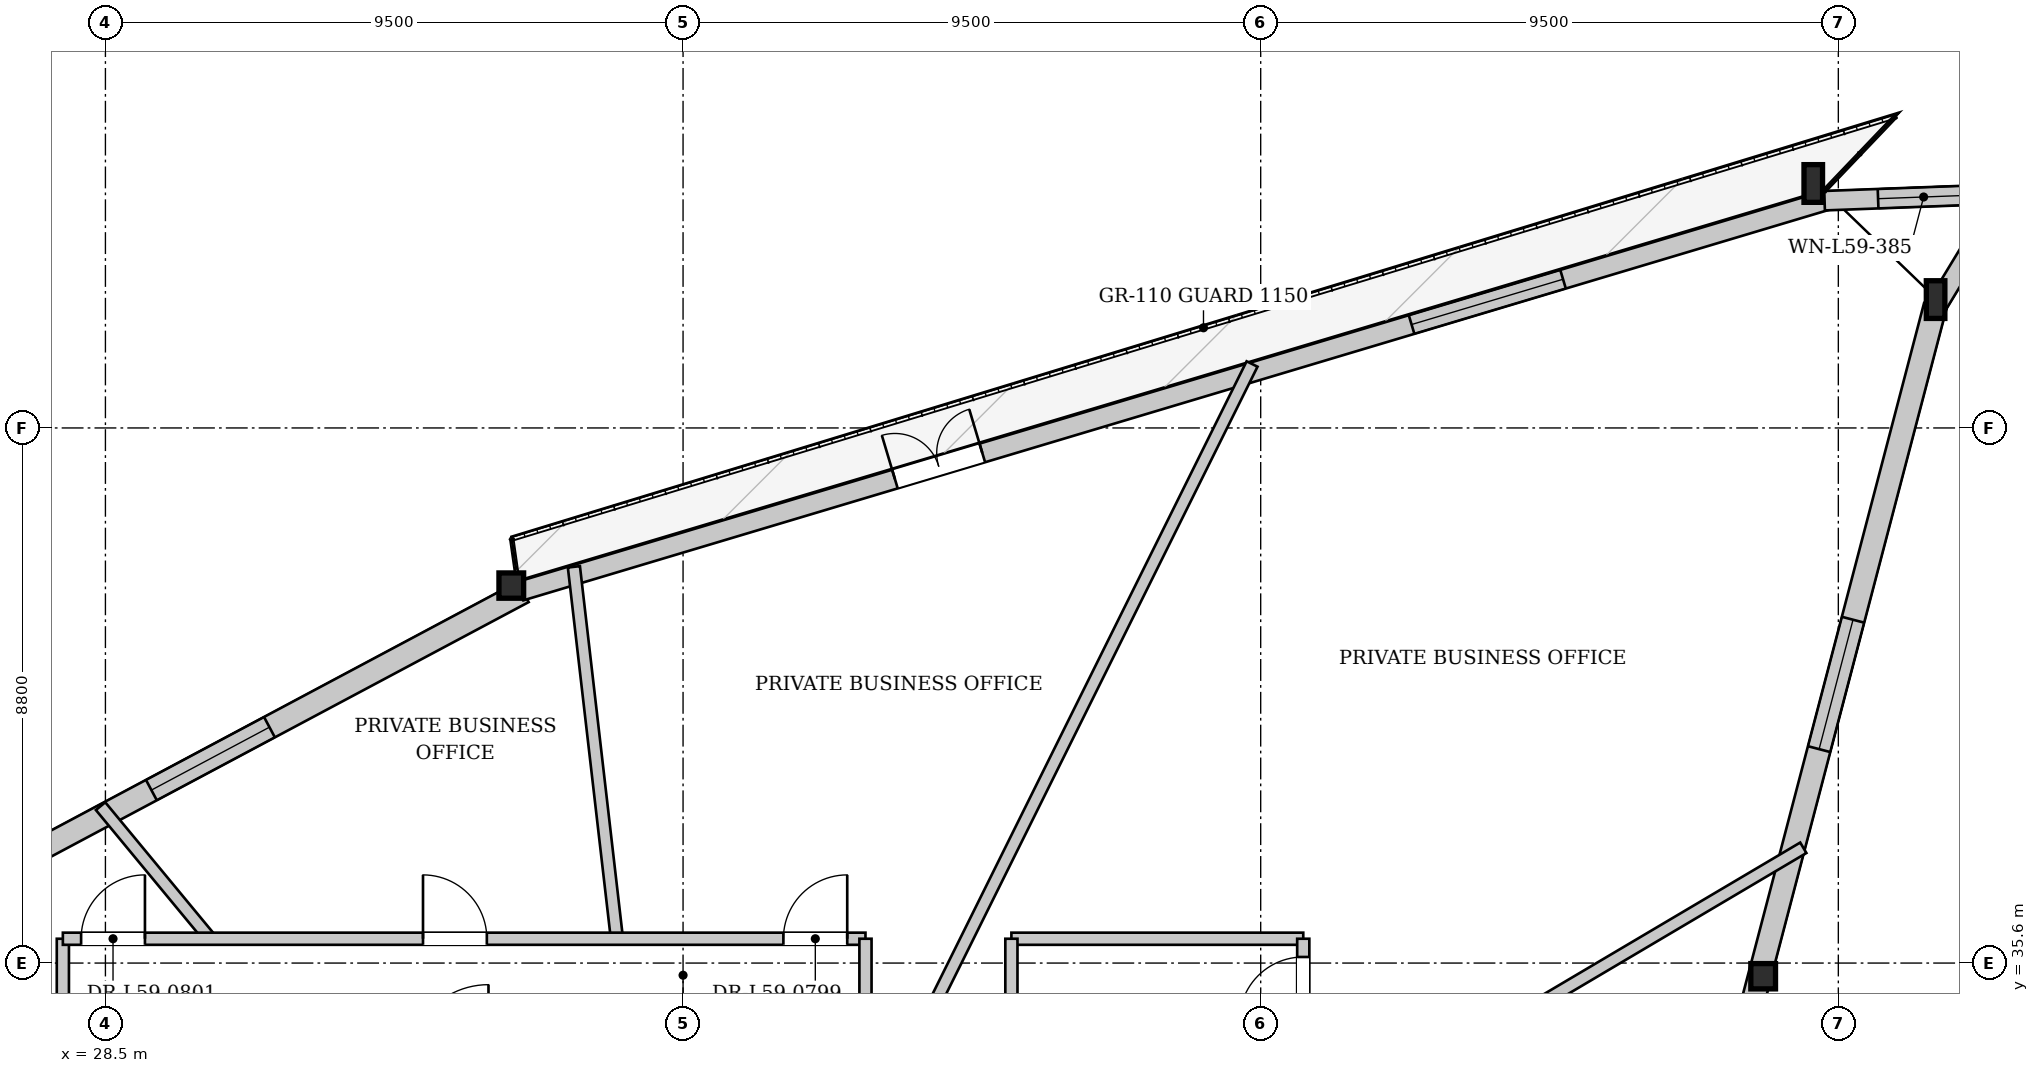
"""IFC4 building model, lengths in metres.
Left out: names, types, materials, properties, quantities, classifications, styles, units other than length and angle.
Written with IfcOpenShell. Run it as: python <this file> out.ifc"""

import sys

from ifc_helpers import new_model, si_unit, direction, frame, frame_2d, origin, origin_2d, place, context, subcontext, project, spatial, rectangle, i_section, extrude, source, transform, mapped, element, fill, save


model = new_model("IFC4")
c1 = context("Model", 3, precision=1e-05, world=origin(), true_north=direction((0.0, 1.0)))
c2 = subcontext(c1, "Body", "Model", "MODEL_VIEW")
j1 = project(units=[si_unit("LENGTHUNIT", "METRE"), si_unit("PLANEANGLEUNIT", "RADIAN")], contexts=[c1])
p1 = place(None, origin())
s1 = spatial("IfcSite", under=j1, at=p1, CompositionType="ELEMENT")
p2 = place(p1, origin())
s2 = spatial("IfcBuilding", under=s1, at=p2, CompositionType="ELEMENT")
p3 = place(p2, frame((0.0, 0.0, 223.8)))
s3 = spatial("IfcBuildingStorey", under=s2, at=p3, CompositionType="ELEMENT", Elevation=223.8)
m1 = source(origin(), c2, "Body", "SweptSolid", [
    extrude(i_section(OverallWidth=0.305, OverallDepth=0.62, WebThickness=0.021, FlangeThickness=0.04, at=origin_2d()), origin(), (0.0, 0.0, 1.0), 3.417),
])
p4 = place(p3, frame((58.778, 46.359, 0.0), z_axis=(-0.104447708162, 0.089016309418, 0.990538627676), x_axis=(-0.648645206746, -0.761090924769, 0.0)))
e1 = element("IfcColumn", 1, at=p4, inside=s3, PredefinedType="COLUMN", context=c2, shape_type="MappedRepresentation", body=[
    mapped(m1, transform((0.0, 0.0, 0.0), x_axis=(1.0, 0.0, 0.0), y_axis=(0.0, 1.0, 0.0), z_axis=(0.0, 0.0, 1.0), scale=1.0)),
])
m2 = source(origin(), c2, "Body", "SweptSolid", [
    extrude(i_section(OverallWidth=0.305, OverallDepth=0.62, WebThickness=0.021, FlangeThickness=0.04, at=origin_2d()), origin(), (0.0, 0.0, 1.0), 3.413),
])
p5 = place(p3, frame((56.767, 48.297, 0.0), z_axis=(-0.105156454528, 0.072178818108, 0.991832817711), x_axis=(-0.56590978088, -0.824467173333, 0.0)))
e2 = element("IfcColumn", 2, at=p5, inside=s3, PredefinedType="COLUMN", context=c2, shape_type="MappedRepresentation", body=[
    mapped(m2, transform((0.0, 0.0, 0.0), x_axis=(1.0, 0.0, 0.0), y_axis=(0.0, 1.0, 0.0), z_axis=(0.0, 0.0, 1.0), scale=1.0)),
])
m3 = source(origin(), c2, "Body", "SweptSolid", [
    extrude(i_section(OverallWidth=0.406, OverallDepth=0.416, WebThickness=0.027, FlangeThickness=0.042, at=origin_2d()), origin(), (0.0, 0.0, 1.0), 3.394),
])
p6 = place(p3, frame((35.282, 41.871, 0.0), z_axis=(-0.063010651639, -0.037475513132, 0.99730900111), x_axis=(0.511173344598, -0.859477638902, 0.0)))
e3 = element("IfcColumn", 3, at=p6, inside=s3, PredefinedType="COLUMN", context=c2, shape_type="MappedRepresentation", body=[
    mapped(m3, transform((0.0, 0.0, 0.0), x_axis=(1.0, 0.0, 0.0), y_axis=(0.0, 1.0, 0.0), z_axis=(0.0, 0.0, 1.0), scale=1.0)),
])
m4 = source(origin(), c2, "Body", "SweptSolid", [
    extrude(i_section(OverallWidth=0.406, OverallDepth=0.416, WebThickness=0.027, FlangeThickness=0.042, at=origin_2d()), origin(), (0.0, 0.0, 1.0), 3.403),
])
p7 = place(p3, frame((55.865, 35.243, 0.0), z_axis=(-0.059266938757, 0.082370999628, 0.99483790056), x_axis=(-0.811722058131, -0.584043919875, 0.0)))
e4 = element("IfcColumn", 4, at=p7, inside=s3, PredefinedType="COLUMN", context=c2, shape_type="MappedRepresentation", body=[
    mapped(m4, transform((0.0, 0.0, 0.0), x_axis=(1.0, 0.0, 0.0), y_axis=(0.0, 1.0, 0.0), z_axis=(0.0, 0.0, 1.0), scale=1.0)),
])
p8 = place(p3, frame((15.581, 31.156, 0.0), z_axis=(0.0, 0.0, 1.0), x_axis=(0.882484000586, 0.470342416448, 0.0)))
e5 = element("IfcWall", 5, at=p8, inside=s3, PredefinedType="SOLIDWALL", context=c2, shape_type="SweptSolid", body=[
    extrude(rectangle(XDim=22.425, YDim=0.38, at=frame_2d((11.213, 0.0))), origin(), (0.0, 0.0, 1.0), 2.822),
])
p9 = place(p8, frame((5.179, 0.0, 0.452)))
e6 = element("IfcOpeningElement", 6, at=p9, cuts=e5, PredefinedType="OPENING", context=c2, shape_type="SweptSolid", body=[
    extrude(rectangle(XDim=2.2, YDim=2.25, at=frame_2d((1.1, 1.125))), frame((0.0, 0.2, 0.0), z_axis=(0.0, -1.0, 0.0), x_axis=(1.0, 0.0, 0.0)), (0.0, 0.0, 1.0), 0.4),
])
p10 = place(p8, frame((15.496, 0.0, 0.452)))
e7 = element("IfcOpeningElement", 7, at=p10, cuts=e5, PredefinedType="OPENING", context=c2, shape_type="SweptSolid", body=[
    extrude(rectangle(XDim=2.2, YDim=2.25, at=frame_2d((1.1, 1.125))), frame((0.0, 0.2, 0.0), z_axis=(0.0, -1.0, 0.0), x_axis=(1.0, 0.0, 0.0)), (0.0, 0.0, 1.0), 0.4),
])
p11 = place(p3, frame((35.328, 41.718, 0.0), z_axis=(0.0, 0.0, 1.0), x_axis=(0.958068349803, 0.286539765313, 0.0)))
e8 = element("IfcWall", 8, at=p11, inside=s3, PredefinedType="SOLIDWALL", context=c2, shape_type="SweptSolid", body=[
    extrude(rectangle(XDim=22.426, YDim=0.32, at=frame_2d((11.213, 0.0))), origin(), (0.0, 0.0, 1.0), 2.822),
])
p12 = place(p11, frame((6.426, 0.0, 0.0)))
e9 = element("IfcOpeningElement", 9, at=p12, cuts=e8, PredefinedType="OPENING", context=c2, shape_type="SweptSolid", body=[
    extrude(rectangle(XDim=1.5, YDim=2.3, at=frame_2d((0.75, 1.15))), frame((0.0, 0.17, 0.0), z_axis=(0.0, -1.0, 0.0), x_axis=(1.0, 0.0, 0.0)), (0.0, 0.0, 1.0), 0.34),
])
p13 = place(p11, frame((15.295, 0.0, 0.352)))
e10 = element("IfcOpeningElement", 10, at=p13, cuts=e8, PredefinedType="OPENING", context=c2, shape_type="SweptSolid", body=[
    extrude(rectangle(XDim=2.6, YDim=2.35, at=frame_2d((1.3, 1.175))), frame((0.0, 0.17, 0.0), z_axis=(0.0, -1.0, 0.0), x_axis=(1.0, 0.0, 0.0)), (0.0, 0.0, 1.0), 0.34),
])
p14 = place(p3, frame((56.773, 48.137, 0.0), z_axis=(0.0, 0.0, 1.0), x_axis=(0.999302372167, 0.03734660603, 0.0)))
e11 = element("IfcWall", 11, at=p14, inside=s3, PredefinedType="SOLIDWALL", context=c2, shape_type="SweptSolid", body=[
    extrude(rectangle(XDim=3.262, YDim=0.32, at=frame_2d((1.631, 0.0))), origin(), (0.0, 0.0, 1.0), 2.822),
])
p15 = place(p14, frame((0.881, 0.0, 0.402)))
e12 = element("IfcOpeningElement", 12, at=p15, cuts=e11, PredefinedType="OPENING", context=c2, shape_type="SweptSolid", body=[
    extrude(rectangle(XDim=1.5, YDim=2.3, at=frame_2d((0.75, 1.15))), frame((0.0, 0.17, 0.0), z_axis=(0.0, -1.0, 0.0), x_axis=(1.0, 0.0, 0.0)), (0.0, 0.0, 1.0), 0.34),
])
p16 = place(p3, frame((59.89, 48.502, 0.0), z_axis=(0.0, 0.0, 1.0), x_axis=(-0.518454432152, -0.855105257721, 0.0)))
e13 = element("IfcWall", 13, at=p16, inside=s3, PredefinedType="SOLIDWALL", context=c2, shape_type="SweptSolid", body=[
    extrude(rectangle(XDim=2.409, YDim=0.32, at=frame_2d((1.205, 0.0))), origin(), (0.0, 0.0, 1.0), 2.822),
])
p17 = place(p3, frame((58.594, 46.407, 0.0), z_axis=(0.0, 0.0, 1.0), x_axis=(-0.253530518145, -0.96732738841, 0.0)))
e14 = element("IfcWall", 14, at=p17, inside=s3, PredefinedType="SOLIDWALL", context=c2, shape_type="SweptSolid", body=[
    extrude(rectangle(XDim=22.982, YDim=0.38, at=frame_2d((11.491, 0.0))), origin(), (0.0, 0.0, 1.0), 2.822),
])
p18 = place(p17, frame((5.335, 0.0, 0.452)))
e15 = element("IfcOpeningElement", 15, at=p18, cuts=e14, PredefinedType="OPENING", context=c2, shape_type="SweptSolid", body=[
    extrude(rectangle(XDim=2.2, YDim=2.25, at=frame_2d((1.1, 1.125))), frame((0.0, 0.2, 0.0), z_axis=(0.0, -1.0, 0.0), x_axis=(1.0, 0.0, 0.0)), (0.0, 0.0, 1.0), 0.4),
])
p19 = place(p17, frame((15.447, 0.0, 0.452)))
e16 = element("IfcOpeningElement", 16, at=p19, cuts=e14, PredefinedType="OPENING", context=c2, shape_type="SweptSolid", body=[
    extrude(rectangle(XDim=2.2, YDim=2.25, at=frame_2d((1.1, 1.125))), frame((0.0, 0.2, 0.0), z_axis=(0.0, -1.0, 0.0), x_axis=(1.0, 0.0, 0.0)), (0.0, 0.0, 1.0), 0.4),
])
p20 = place(p3, frame((48.2, 32.632, 0.0), z_axis=(0.0, 0.0, 1.0), x_axis=(0.860740290166, 0.509044352571, 0.0)))
e17 = element("IfcWall", 17, at=p20, inside=s3, PredefinedType="PARTITIONING", context=c2, shape_type="SweptSolid", body=[
    extrude(rectangle(XDim=9.555, YDim=0.2, at=frame_2d((4.777, 0.0))), origin(), (0.0, 0.0, 1.0), 3.33),
])
p21 = place(p3, frame((41.748, 34.15, 0.0), z_axis=(0.0, 0.0, 1.0), x_axis=(0.44463448422, 0.895712105222, 0.0)))
e18 = element("IfcWall", 18, at=p21, inside=s3, PredefinedType="PARTITIONING", context=c2, shape_type="SweptSolid", body=[
    extrude(rectangle(XDim=12.618, YDim=0.2, at=frame_2d((6.309, 0.0))), origin(), (0.0, 0.0, 1.0), 3.33),
])
p22 = place(p3, frame((36.912, 36.0, 0.0), z_axis=(0.0, 0.0, 1.0), x_axis=(-0.114952203338, 0.993371023811, 0.0)))
e19 = element("IfcWall", 19, at=p22, inside=s3, PredefinedType="PARTITIONING", context=c2, shape_type="SweptSolid", body=[
    extrude(rectangle(XDim=6.157, YDim=0.2, at=frame_2d((3.079, 0.0))), origin(), (0.0, 0.0, 1.0), 3.33),
])
p23 = place(p3, frame((30.224, 36.0, 0.0), z_axis=(0.0, 0.0, 1.0), x_axis=(-0.637396404574, 0.770536062386, 0.0)))
e20 = element("IfcWall", 20, at=p23, inside=s3, PredefinedType="PARTITIONING", context=c2, shape_type="SweptSolid", body=[
    extrude(rectangle(XDim=2.829, YDim=0.2, at=frame_2d((1.415, 0.0))), origin(), (0.0, 0.0, 1.0), 3.33),
])
p24 = place(p3, frame((27.8, 17.2, 0.0), z_axis=(0.0, 0.0, 1.0), x_axis=(0.0, 1.0, 0.0)))
e21 = element("IfcWall", 21, at=p24, inside=s3, PredefinedType="PARTITIONING", context=c2, shape_type="SweptSolid", body=[
    extrude(rectangle(XDim=18.8, YDim=0.2, at=frame_2d((9.4, 0.0))), origin(), (0.0, 0.0, 1.0), 3.33),
])
p25 = place(p24, frame((7.944, 0.0, 0.0)))
e22 = element("IfcOpeningElement", 22, at=p25, cuts=e21, PredefinedType="OPENING", context=c2, shape_type="SweptSolid", body=[
    extrude(rectangle(XDim=1.05, YDim=2.2, at=frame_2d((0.525, 1.1))), frame((0.0, 0.11, 0.0), z_axis=(0.0, -1.0, 0.0), x_axis=(1.0, 0.0, 0.0)), (0.0, 0.0, 1.0), 0.22),
])
p26 = place(p24, frame((1.628, 0.0, 0.0)))
e23 = element("IfcOpeningElement", 23, at=p26, cuts=e21, PredefinedType="OPENING", context=c2, shape_type="SweptSolid", body=[
    extrude(rectangle(XDim=1.05, YDim=2.2, at=frame_2d((0.525, 1.1))), frame((0.0, 0.11, 0.0), z_axis=(0.0, -1.0, 0.0), x_axis=(1.0, 0.0, 0.0)), (0.0, 0.0, 1.0), 0.22),
])
p27 = place(p3, frame((27.8, 36.0, 0.0), z_axis=(0.0, 0.0, 1.0), x_axis=(1.0, 0.0, 0.0)))
e24 = element("IfcWall", 24, at=p27, inside=s3, PredefinedType="PARTITIONING", context=c2, shape_type="SweptSolid", body=[
    extrude(rectangle(XDim=13.2, YDim=0.2, at=frame_2d((6.6, 0.0))), origin(), (0.0, 0.0, 1.0), 3.33),
])
p28 = place(p27, frame((11.85, 0.0, 0.0)))
e25 = element("IfcOpeningElement", 25, at=p28, cuts=e24, PredefinedType="OPENING", context=c2, shape_type="SweptSolid", body=[
    extrude(rectangle(XDim=1.05, YDim=2.2, at=frame_2d((0.525, 1.1))), frame((0.0, 0.11, 0.0), z_axis=(0.0, -1.0, 0.0), x_axis=(1.0, 0.0, 0.0)), (0.0, 0.0, 1.0), 0.22),
])
p29 = place(p27, frame((5.923, 0.0, 0.0)))
e26 = element("IfcOpeningElement", 26, at=p29, cuts=e24, PredefinedType="OPENING", context=c2, shape_type="SweptSolid", body=[
    extrude(rectangle(XDim=1.05, YDim=2.2, at=frame_2d((0.525, 1.1))), frame((0.0, 0.11, 0.0), z_axis=(0.0, -1.0, 0.0), x_axis=(1.0, 0.0, 0.0)), (0.0, 0.0, 1.0), 0.22),
])
p30 = place(p27, frame((0.3, 0.0, 0.0)))
e27 = element("IfcOpeningElement", 27, at=p30, cuts=e24, PredefinedType="OPENING", context=c2, shape_type="SweptSolid", body=[
    extrude(rectangle(XDim=1.05, YDim=2.2, at=frame_2d((0.525, 1.1))), frame((0.0, 0.11, 0.0), z_axis=(0.0, -1.0, 0.0), x_axis=(1.0, 0.0, 0.0)), (0.0, 0.0, 1.0), 0.22),
])
p31 = place(p3, frame((41.0, 34.15, 0.0), z_axis=(0.0, 0.0, 1.0), x_axis=(0.0, 1.0, 0.0)))
e28 = element("IfcWall", 28, at=p31, inside=s3, PredefinedType="PARTITIONING", context=c2, shape_type="SweptSolid", body=[
    extrude(rectangle(XDim=1.85, YDim=0.2, at=frame_2d((0.925, 0.0))), origin(), (0.0, 0.0, 1.0), 3.33),
])
p32 = place(p3, frame((43.4, 36.0, 0.0), z_axis=(0.0, 0.0, 1.0), x_axis=(1.0, 0.0, 0.0)))
e29 = element("IfcWall", 29, at=p32, inside=s3, PredefinedType="PARTITIONING", context=c2, shape_type="SweptSolid", body=[
    extrude(rectangle(XDim=4.8, YDim=0.2, at=frame_2d((2.4, 0.0))), origin(), (0.0, 0.0, 1.0), 3.33),
])
p33 = place(p3, frame((43.4, 34.15, 0.0), z_axis=(0.0, 0.0, 1.0), x_axis=(0.0, 1.0, 0.0)))
e30 = element("IfcWall", 30, at=p33, inside=s3, PredefinedType="PARTITIONING", context=c2, shape_type="SweptSolid", body=[
    extrude(rectangle(XDim=1.85, YDim=0.2, at=frame_2d((0.925, 0.0))), origin(), (0.0, 0.0, 1.0), 3.33),
])
p34 = place(p3, frame((48.2, 17.2, 0.0), z_axis=(0.0, 0.0, 1.0), x_axis=(0.0, 1.0, 0.0)))
e31 = element("IfcWall", 31, at=p34, inside=s3, PredefinedType="PARTITIONING", context=c2, shape_type="SweptSolid", body=[
    extrude(rectangle(XDim=18.8, YDim=0.2, at=frame_2d((9.4, 0.0))), origin(), (0.0, 0.0, 1.0), 3.015),
])
p35 = place(p34, frame((11.705, 0.0, 0.0)))
e32 = element("IfcOpeningElement", 32, at=p35, cuts=e31, PredefinedType="OPENING", context=c2, shape_type="SweptSolid", body=[
    extrude(rectangle(XDim=1.05, YDim=2.2, at=frame_2d((0.525, 1.1))), frame((0.0, 0.11, 0.0), z_axis=(0.0, -1.0, 0.0), x_axis=(1.0, 0.0, 0.0)), (0.0, 0.0, 1.0), 0.22),
])
p36 = place(p34, frame((17.45, 0.0, 0.0)))
e33 = element("IfcOpeningElement", 33, at=p36, cuts=e31, PredefinedType="OPENING", context=c2, shape_type="SweptSolid", body=[
    extrude(rectangle(XDim=1.05, YDim=2.2, at=frame_2d((0.525, 1.1))), frame((0.0, 0.11, 0.0), z_axis=(0.0, -1.0, 0.0), x_axis=(1.0, 0.0, 0.0)), (0.0, 0.0, 1.0), 0.22),
])
p37 = place(p34, frame((0.3, 0.0, 0.0)))
e34 = element("IfcOpeningElement", 34, at=p37, cuts=e31, PredefinedType="OPENING", context=c2, shape_type="SweptSolid", body=[
    extrude(rectangle(XDim=1.05, YDim=2.2, at=frame_2d((0.525, 1.1))), frame((0.0, 0.11, 0.0), z_axis=(0.0, -1.0, 0.0), x_axis=(1.0, 0.0, 0.0)), (0.0, 0.0, 1.0), 0.22),
])
p38 = place(p34, frame((4.377, 0.0, 0.0)))
e35 = element("IfcOpeningElement", 35, at=p38, cuts=e31, PredefinedType="OPENING", context=c2, shape_type="SweptSolid", body=[
    extrude(rectangle(XDim=0.9, YDim=2.1, at=frame_2d((0.45, 1.05))), frame((0.0, 0.11, 0.0), z_axis=(0.0, -1.0, 0.0), x_axis=(1.0, 0.0, 0.0)), (0.0, 0.0, 1.0), 0.22),
])
m5 = source(origin(), c2, "Body", "SweptSolid", [
    extrude(rectangle(XDim=2.2, YDim=2.25, at=frame_2d((1.1, 1.125))), frame((0.0, 0.03, 0.0), z_axis=(0.0, -1.0, 0.0), x_axis=(1.0, 0.0, 0.0)), (0.0, 0.0, 1.0), 0.06),
])
p39 = place(p10, origin())
e36 = element("IfcWindow", 36, at=p39, inside=s3, PartitioningType="SINGLE_PANEL", PredefinedType="WINDOW", context=c2, shape_type="MappedRepresentation", body=[
    mapped(m5, transform((0.0, 0.0, 0.0), x_axis=(1.0, 0.0, 0.0), y_axis=(0.0, 1.0, 0.0), z_axis=(0.0, 0.0, 1.0), scale=1.0)),
])
fill(e7, e36)
m6 = source(origin(), c2, "Body", "SweptSolid", [
    extrude(rectangle(XDim=1.5, YDim=2.3, at=frame_2d((0.75, 1.15))), frame((0.0, 0.025, 0.0), z_axis=(0.0, -1.0, 0.0), x_axis=(1.0, 0.0, 0.0)), (0.0, 0.0, 1.0), 0.05),
])
p40 = place(p12, origin())
e37 = element("IfcDoor", 37, at=p40, inside=s3, OperationType="DOUBLE_DOOR_SINGLE_SWING", PredefinedType="DOOR", context=c2, shape_type="MappedRepresentation", body=[
    mapped(m6, transform((0.0, 0.0, 0.0), x_axis=(1.0, 0.0, 0.0), y_axis=(0.0, 1.0, 0.0), z_axis=(0.0, 0.0, 1.0), scale=1.0)),
])
fill(e9, e37)
m7 = source(origin(), c2, "Body", "SweptSolid", [
    extrude(rectangle(XDim=2.6, YDim=2.35, at=frame_2d((1.3, 1.175))), frame((0.0, 0.03, 0.0), z_axis=(0.0, -1.0, 0.0), x_axis=(1.0, 0.0, 0.0)), (0.0, 0.0, 1.0), 0.06),
])
p41 = place(p13, origin())
e38 = element("IfcWindow", 38, at=p41, inside=s3, PartitioningType="SINGLE_PANEL", PredefinedType="WINDOW", context=c2, shape_type="MappedRepresentation", body=[
    mapped(m7, transform((0.0, 0.0, 0.0), x_axis=(1.0, 0.0, 0.0), y_axis=(0.0, 1.0, 0.0), z_axis=(0.0, 0.0, 1.0), scale=1.0)),
])
fill(e10, e38)
m8 = source(origin(), c2, "Body", "SweptSolid", [
    extrude(rectangle(XDim=1.5, YDim=2.3, at=frame_2d((0.75, 1.15))), frame((0.0, 0.03, 0.0), z_axis=(0.0, -1.0, 0.0), x_axis=(1.0, 0.0, 0.0)), (0.0, 0.0, 1.0), 0.06),
])
p42 = place(p15, origin())
e39 = element("IfcWindow", 39, at=p42, inside=s3, PartitioningType="SINGLE_PANEL", PredefinedType="WINDOW", context=c2, shape_type="MappedRepresentation", body=[
    mapped(m8, transform((0.0, 0.0, 0.0), x_axis=(1.0, 0.0, 0.0), y_axis=(0.0, 1.0, 0.0), z_axis=(0.0, 0.0, 1.0), scale=1.0)),
])
fill(e12, e39)
p43 = place(p18, origin())
e40 = element("IfcWindow", 40, at=p43, inside=s3, PartitioningType="SINGLE_PANEL", PredefinedType="WINDOW", context=c2, shape_type="MappedRepresentation", body=[
    mapped(m5, transform((0.0, 0.0, 0.0), x_axis=(1.0, 0.0, 0.0), y_axis=(0.0, 1.0, 0.0), z_axis=(0.0, 0.0, 1.0), scale=1.0)),
])
fill(e15, e40)
m9 = source(origin(), c2, "Body", "SweptSolid", [
    extrude(rectangle(XDim=1.05, YDim=2.2, at=frame_2d((0.525, 1.1))), frame((0.0, 0.025, 0.0), z_axis=(0.0, -1.0, 0.0), x_axis=(1.0, 0.0, 0.0)), (0.0, 0.0, 1.0), 0.05),
])
p44 = place(p28, origin())
e41 = element("IfcDoor", 41, at=p44, inside=s3, OperationType="SINGLE_SWING_RIGHT", PredefinedType="DOOR", context=c2, shape_type="MappedRepresentation", body=[
    mapped(m9, transform((0.0, 0.0, 0.0), x_axis=(1.0, 0.0, 0.0), y_axis=(0.0, 1.0, 0.0), z_axis=(0.0, 0.0, 1.0), scale=1.0)),
])
fill(e25, e41)
p45 = place(p29, origin())
e42 = element("IfcDoor", 42, at=p45, inside=s3, OperationType="SINGLE_SWING_LEFT", PredefinedType="DOOR", context=c2, shape_type="MappedRepresentation", body=[
    mapped(m9, transform((0.0, 0.0, 0.0), x_axis=(1.0, 0.0, 0.0), y_axis=(0.0, 1.0, 0.0), z_axis=(0.0, 0.0, 1.0), scale=1.0)),
])
fill(e26, e42)
p46 = place(p30, origin())
e43 = element("IfcDoor", 43, at=p46, inside=s3, OperationType="SINGLE_SWING_RIGHT", PredefinedType="DOOR", context=c2, shape_type="MappedRepresentation", body=[
    mapped(m9, transform((0.0, 0.0, 0.0), x_axis=(1.0, 0.0, 0.0), y_axis=(0.0, 1.0, 0.0), z_axis=(0.0, 0.0, 1.0), scale=1.0)),
])
fill(e27, e43)
p47 = place(p36, origin())
e44 = element("IfcDoor", 44, at=p47, inside=s3, OperationType="SINGLE_SWING_LEFT", PredefinedType="DOOR", context=c2, shape_type="MappedRepresentation", body=[
    mapped(m9, transform((0.0, 0.0, 0.0), x_axis=(1.0, 0.0, 0.0), y_axis=(0.0, 1.0, 0.0), z_axis=(0.0, 0.0, 1.0), scale=1.0)),
])
fill(e33, e44)
save(model, sys.argv[1])
